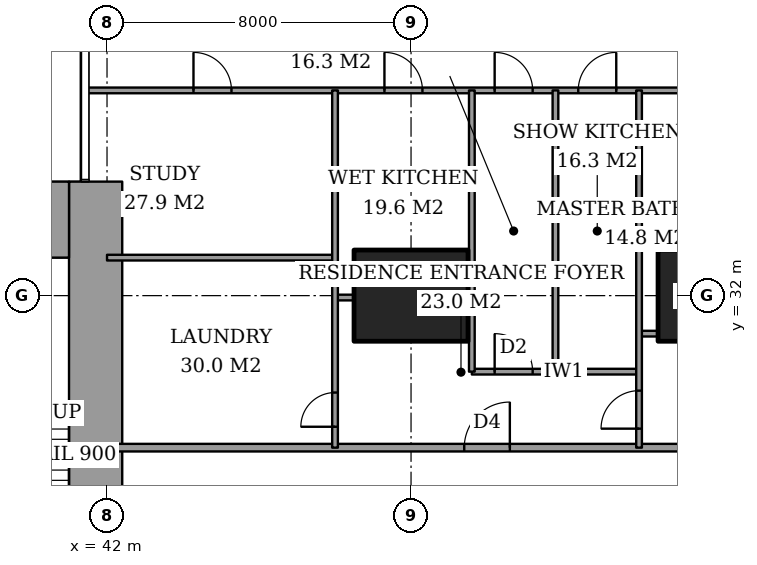
"""IFC4 building model, lengths in metres.
Left out: names, types, materials, properties, quantities, classifications, styles, units other than length and angle.
Written with IfcOpenShell. Run it as: python <this file> out.ifc"""

import sys

from ifc_helpers import new_model, si_unit, direction, frame, frame_2d, origin, origin_2d, place, context, subcontext, project, spatial, rectangle, extrude, element, fill, save


model = new_model("IFC4")
c1 = context("Model", 3, precision=1e-05, world=origin(), true_north=direction((0.0, 1.0)))
c2 = subcontext(c1, "Body", "Model", "MODEL_VIEW")
j1 = project(units=[si_unit("LENGTHUNIT", "METRE"), si_unit("PLANEANGLEUNIT", "RADIAN")], contexts=[c1])
p1 = place(None, origin())
s1 = spatial("IfcSite", under=j1, at=p1, CompositionType="ELEMENT")
p2 = place(p1, origin())
s2 = spatial("IfcBuilding", under=s1, at=p2, CompositionType="ELEMENT")
p3 = place(p2, frame((0.0, 0.0, 83.6)))
s3 = spatial("IfcBuildingStorey", under=s2, at=p3, CompositionType="ELEMENT", Elevation=83.6)
for number, where, z_axis, x_axis in (
    (1, (50.0, 32.0, 0.0), (0.0, 0.0, 1.0), (1.0, 0.0, 0.0)),
    (2, (58.0, 32.0, 0.0), (0.0, 0.0, 1.0), (1.0, 0.0, 0.0)),
):
    element("IfcColumn", number, at=place(p3, frame(where, z_axis=z_axis, x_axis=x_axis)), inside=s3, PredefinedType="COLUMN", context=c2, shape_type="SweptSolid", body=[
        extrude(rectangle(XDim=3.0, YDim=2.4, at=origin_2d()), origin(), (0.0, 0.0, 1.0), 3.6),
    ])
p4 = place(p3, frame((37.85, 34.0, 0.0), z_axis=(0.0, 0.0, 1.0), x_axis=(1.0, 0.0, 0.0)))
e3 = element("IfcWall", 3, at=p4, inside=s3, PredefinedType="SHEAR", context=c2, shape_type="SweptSolid", body=[
    extrude(rectangle(XDim=3.15, YDim=2.0, at=frame_2d((1.575, 0.0))), origin(), (0.0, 0.0, 1.0), 3.6),
])
p5 = place(p3, frame((41.7, 24.85, 0.0), z_axis=(0.0, 0.0, 1.0), x_axis=(0.0, 1.0, 0.0)))
e4 = element("IfcWall", 4, at=p5, inside=s3, PredefinedType="SHEAR", context=c2, shape_type="SweptSolid", body=[
    extrude(rectangle(XDim=10.15, YDim=1.4, at=frame_2d((5.075, 0.0))), origin(), (0.0, 0.0, 1.0), 3.6),
])
p6 = place(p3, frame((42.0, 28.0, 0.0), z_axis=(0.0, 0.0, 1.0), x_axis=(1.0, 0.0, 0.0)))
e5 = element("IfcWall", 5, at=p6, inside=s3, PredefinedType="PARTITIONING", context=c2, shape_type="SweptSolid", body=[
    extrude(rectangle(XDim=17.275, YDim=0.2, at=frame_2d((8.637, 0.0))), origin(), (0.0, 0.0, 1.0), 3.35),
])
p7 = place(p6, frame((9.4, 0.0, 0.0)))
e6 = element("IfcOpeningElement", 6, at=p7, cuts=e5, PredefinedType="OPENING", context=c2, shape_type="SweptSolid", body=[
    extrude(rectangle(XDim=1.2, YDim=2.4, at=frame_2d((0.6, 1.2))), frame((0.0, 0.11, 0.0), z_axis=(0.0, -1.0, 0.0), x_axis=(1.0, 0.0, 0.0)), (0.0, 0.0, 1.0), 0.22),
])
p8 = place(p3, frame((51.6, 30.0, 0.0), z_axis=(0.0, 0.0, 1.0), x_axis=(1.0, 0.0, 0.0)))
e7 = element("IfcWall", 7, at=p8, inside=s3, PredefinedType="PARTITIONING", context=c2, shape_type="SweptSolid", body=[
    extrude(rectangle(XDim=4.4, YDim=0.15, at=frame_2d((2.2, 0.0))), origin(), (0.0, 0.0, 1.0), 3.35),
])
p9 = place(p8, frame((0.6, 0.0, 0.0)))
e8 = element("IfcOpeningElement", 8, at=p9, cuts=e7, PredefinedType="OPENING", context=c2, shape_type="SweptSolid", body=[
    extrude(rectangle(XDim=1.0, YDim=2.1, at=frame_2d((0.5, 1.05))), frame((0.0, 0.085, 0.0), z_axis=(0.0, -1.0, 0.0), x_axis=(1.0, 0.0, 0.0)), (0.0, 0.0, 1.0), 0.17),
])
p10 = place(p3, frame((56.0, 31.0, 0.0), z_axis=(0.0, 0.0, 1.0), x_axis=(1.0, 0.0, 0.0)))
e9 = element("IfcWall", 9, at=p10, inside=s3, PredefinedType="PARTITIONING", context=c2, shape_type="SweptSolid", body=[
    extrude(rectangle(XDim=0.5, YDim=0.15, at=frame_2d((0.25, 0.0))), origin(), (0.0, 0.0, 1.0), 3.35),
])
p11 = place(p3, frame((48.0, 31.95, 0.0), z_axis=(0.0, 0.0, 1.0), x_axis=(1.0, 0.0, 0.0)))
e10 = element("IfcWall", 10, at=p11, inside=s3, PredefinedType="PARTITIONING", context=c2, shape_type="SweptSolid", body=[
    extrude(rectangle(XDim=0.5, YDim=0.15, at=frame_2d((0.25, 0.0))), origin(), (0.0, 0.0, 1.0), 2.634),
])
p12 = place(p3, frame((42.0, 33.0, 0.0), z_axis=(0.0, 0.0, 1.0), x_axis=(1.0, 0.0, 0.0)))
e11 = element("IfcWall", 11, at=p12, inside=s3, PredefinedType="PARTITIONING", context=c2, shape_type="SweptSolid", body=[
    extrude(rectangle(XDim=6.0, YDim=0.15, at=frame_2d((3.0, 0.0))), origin(), (0.0, 0.0, 1.0), 3.35),
])
p13 = place(p3, frame((41.439, 37.4, 0.0), z_axis=(0.0, 0.0, 1.0), x_axis=(1.0, 0.0, 0.0)))
e12 = element("IfcWall", 12, at=p13, inside=s3, PredefinedType="PARTITIONING", context=c2, shape_type="SweptSolid", body=[
    extrude(rectangle(XDim=25.011, YDim=0.15, at=frame_2d((12.505, 0.0))), origin(), (0.0, 0.0, 1.0), 3.35),
])
p14 = place(p13, frame((10.761, 0.0, 0.0)))
e13 = element("IfcOpeningElement", 13, at=p14, cuts=e12, PredefinedType="OPENING", context=c2, shape_type="SweptSolid", body=[
    extrude(rectangle(XDim=1.0, YDim=2.1, at=frame_2d((0.5, 1.05))), frame((0.0, 0.085, 0.0), z_axis=(0.0, -1.0, 0.0), x_axis=(1.0, 0.0, 0.0)), (0.0, 0.0, 1.0), 0.17),
])
p15 = place(p13, frame((20.924, 0.0, 0.0)))
e14 = element("IfcOpeningElement", 14, at=p15, cuts=e12, PredefinedType="OPENING", context=c2, shape_type="SweptSolid", body=[
    extrude(rectangle(XDim=1.0, YDim=2.1, at=frame_2d((0.5, 1.05))), frame((0.0, 0.085, 0.0), z_axis=(0.0, -1.0, 0.0), x_axis=(1.0, 0.0, 0.0)), (0.0, 0.0, 1.0), 0.17),
])
p16 = place(p13, frame((15.749, 0.0, 0.0)))
e15 = element("IfcOpeningElement", 15, at=p16, cuts=e12, PredefinedType="OPENING", context=c2, shape_type="SweptSolid", body=[
    extrude(rectangle(XDim=0.9, YDim=2.1, at=frame_2d((0.45, 1.05))), frame((0.0, 0.085, 0.0), z_axis=(0.0, -1.0, 0.0), x_axis=(1.0, 0.0, 0.0)), (0.0, 0.0, 1.0), 0.17),
])
p17 = place(p13, frame((12.961, 0.0, 0.0)))
e16 = element("IfcOpeningElement", 16, at=p17, cuts=e12, PredefinedType="OPENING", context=c2, shape_type="SweptSolid", body=[
    extrude(rectangle(XDim=1.0, YDim=2.1, at=frame_2d((0.5, 1.05))), frame((0.0, 0.085, 0.0), z_axis=(0.0, -1.0, 0.0), x_axis=(1.0, 0.0, 0.0)), (0.0, 0.0, 1.0), 0.17),
])
p18 = place(p13, frame((7.861, 0.0, 0.0)))
e17 = element("IfcOpeningElement", 17, at=p18, cuts=e12, PredefinedType="OPENING", context=c2, shape_type="SweptSolid", body=[
    extrude(rectangle(XDim=1.0, YDim=2.1, at=frame_2d((0.5, 1.05))), frame((0.0, 0.085, 0.0), z_axis=(0.0, -1.0, 0.0), x_axis=(1.0, 0.0, 0.0)), (0.0, 0.0, 1.0), 0.17),
])
p19 = place(p13, frame((2.836, 0.0, 0.0)))
e18 = element("IfcOpeningElement", 18, at=p19, cuts=e12, PredefinedType="OPENING", context=c2, shape_type="SweptSolid", body=[
    extrude(rectangle(XDim=1.0, YDim=2.1, at=frame_2d((0.5, 1.05))), frame((0.0, 0.085, 0.0), z_axis=(0.0, -1.0, 0.0), x_axis=(1.0, 0.0, 0.0)), (0.0, 0.0, 1.0), 0.17),
])
p20 = place(p3, frame((48.0, 28.0, 0.0), z_axis=(0.0, 0.0, 1.0), x_axis=(0.0, 1.0, 0.0)))
e19 = element("IfcWall", 19, at=p20, inside=s3, PredefinedType="PARTITIONING", context=c2, shape_type="SweptSolid", body=[
    extrude(rectangle(XDim=9.4, YDim=0.15, at=frame_2d((4.7, 0.0))), origin(), (0.0, 0.0, 1.0), 3.35),
])
p21 = place(p20, frame((0.55, 0.0, 0.0)))
e20 = element("IfcOpeningElement", 20, at=p21, cuts=e19, PredefinedType="OPENING", context=c2, shape_type="SweptSolid", body=[
    extrude(rectangle(XDim=0.9, YDim=2.1, at=frame_2d((0.45, 1.05))), frame((0.0, 0.085, 0.0), z_axis=(0.0, -1.0, 0.0), x_axis=(1.0, 0.0, 0.0)), (0.0, 0.0, 1.0), 0.17),
])
for number, where, z_axis, x_axis in (
    (21, (51.6, 30.0, 0.0), (0.0, 0.0, 1.0), (0.0, 1.0, 0.0)),
    (22, (53.8, 30.0, 0.0), (0.0, 0.0, 1.0), (0.0, 1.0, 0.0)),
):
    element("IfcWall", number, at=place(p3, frame(where, z_axis=z_axis, x_axis=x_axis)), inside=s3, PredefinedType="PARTITIONING", context=c2, shape_type="SweptSolid", body=[
        extrude(rectangle(XDim=7.4, YDim=0.15, at=frame_2d((3.7, 0.0))), origin(), (0.0, 0.0, 1.0), 3.35),
    ])
p22 = place(p3, frame((56.0, 28.0, 0.0), z_axis=(0.0, 0.0, 1.0), x_axis=(0.0, 1.0, 0.0)))
e23 = element("IfcWall", 23, at=p22, inside=s3, PredefinedType="PARTITIONING", context=c2, shape_type="SweptSolid", body=[
    extrude(rectangle(XDim=9.4, YDim=0.15, at=frame_2d((4.7, 0.0))), origin(), (0.0, 0.0, 1.0), 3.35),
])
p23 = place(p22, frame((0.5, 0.0, 0.0)))
e24 = element("IfcOpeningElement", 24, at=p23, cuts=e23, PredefinedType="OPENING", context=c2, shape_type="SweptSolid", body=[
    extrude(rectangle(XDim=1.0, YDim=2.1, at=frame_2d((0.5, 1.05))), frame((0.0, 0.085, 0.0), z_axis=(0.0, -1.0, 0.0), x_axis=(1.0, 0.0, 0.0)), (0.0, 0.0, 1.0), 0.17),
])
p24 = place(p14, origin())
e25 = element("IfcDoor", 25, at=p24, inside=s3, OperationType="SINGLE_SWING_RIGHT", PredefinedType="DOOR", context=c2, shape_type="SweptSolid", body=[
    extrude(rectangle(XDim=1.0, YDim=2.1, at=frame_2d((0.5, 1.05))), frame((0.0, 0.025, 0.0), z_axis=(0.0, -1.0, 0.0), x_axis=(1.0, 0.0, 0.0)), (0.0, 0.0, 1.0), 0.05),
])
fill(e13, e25)
p25 = place(p23, origin())
e26 = element("IfcDoor", 26, at=p25, inside=s3, OperationType="SINGLE_SWING_RIGHT", PredefinedType="DOOR", context=c2, shape_type="SweptSolid", body=[
    extrude(rectangle(XDim=1.0, YDim=2.1, at=frame_2d((0.5, 1.05))), frame((0.0, 0.025, 0.0), z_axis=(0.0, -1.0, 0.0), x_axis=(1.0, 0.0, 0.0)), (0.0, 0.0, 1.0), 0.05),
])
fill(e24, e26)
p26 = place(p7, origin())
e27 = element("IfcDoor", 27, at=p26, inside=s3, OperationType="SINGLE_SWING_LEFT", PredefinedType="DOOR", context=c2, shape_type="SweptSolid", body=[
    extrude(rectangle(XDim=1.2, YDim=2.4, at=frame_2d((0.6, 1.2))), frame((0.0, 0.025, 0.0), z_axis=(0.0, -1.0, 0.0), x_axis=(1.0, 0.0, 0.0)), (0.0, 0.0, 1.0), 0.05),
])
fill(e6, e27)
p27 = place(p17, origin())
e28 = element("IfcDoor", 28, at=p27, inside=s3, OperationType="SINGLE_SWING_LEFT", PredefinedType="DOOR", context=c2, shape_type="SweptSolid", body=[
    extrude(rectangle(XDim=1.0, YDim=2.1, at=frame_2d((0.5, 1.05))), frame((0.0, 0.025, 0.0), z_axis=(0.0, -1.0, 0.0), x_axis=(1.0, 0.0, 0.0)), (0.0, 0.0, 1.0), 0.05),
])
fill(e16, e28)
p28 = place(p9, origin())
e29 = element("IfcDoor", 29, at=p28, inside=s3, OperationType="SINGLE_SWING_RIGHT", PredefinedType="DOOR", context=c2, shape_type="SweptSolid", body=[
    extrude(rectangle(XDim=1.0, YDim=2.1, at=frame_2d((0.5, 1.05))), frame((0.0, 0.025, 0.0), z_axis=(0.0, -1.0, 0.0), x_axis=(1.0, 0.0, 0.0)), (0.0, 0.0, 1.0), 0.05),
])
fill(e8, e29)
p29 = place(p18, origin())
e30 = element("IfcDoor", 30, at=p29, inside=s3, OperationType="SINGLE_SWING_RIGHT", PredefinedType="DOOR", context=c2, shape_type="SweptSolid", body=[
    extrude(rectangle(XDim=1.0, YDim=2.1, at=frame_2d((0.5, 1.05))), frame((0.0, 0.025, 0.0), z_axis=(0.0, -1.0, 0.0), x_axis=(1.0, 0.0, 0.0)), (0.0, 0.0, 1.0), 0.05),
])
fill(e17, e30)
p30 = place(p19, origin())
e31 = element("IfcDoor", 31, at=p30, inside=s3, OperationType="SINGLE_SWING_RIGHT", PredefinedType="DOOR", context=c2, shape_type="SweptSolid", body=[
    extrude(rectangle(XDim=1.0, YDim=2.1, at=frame_2d((0.5, 1.05))), frame((0.0, 0.025, 0.0), z_axis=(0.0, -1.0, 0.0), x_axis=(1.0, 0.0, 0.0)), (0.0, 0.0, 1.0), 0.05),
])
fill(e18, e31)
p31 = place(p21, origin())
e32 = element("IfcDoor", 32, at=p31, inside=s3, OperationType="SINGLE_SWING_RIGHT", PredefinedType="DOOR", context=c2, shape_type="SweptSolid", body=[
    extrude(rectangle(XDim=0.9, YDim=2.1, at=frame_2d((0.45, 1.05))), frame((0.0, 0.025, 0.0), z_axis=(0.0, -1.0, 0.0), x_axis=(1.0, 0.0, 0.0)), (0.0, 0.0, 1.0), 0.05),
])
fill(e20, e32)
save(model, sys.argv[1])
